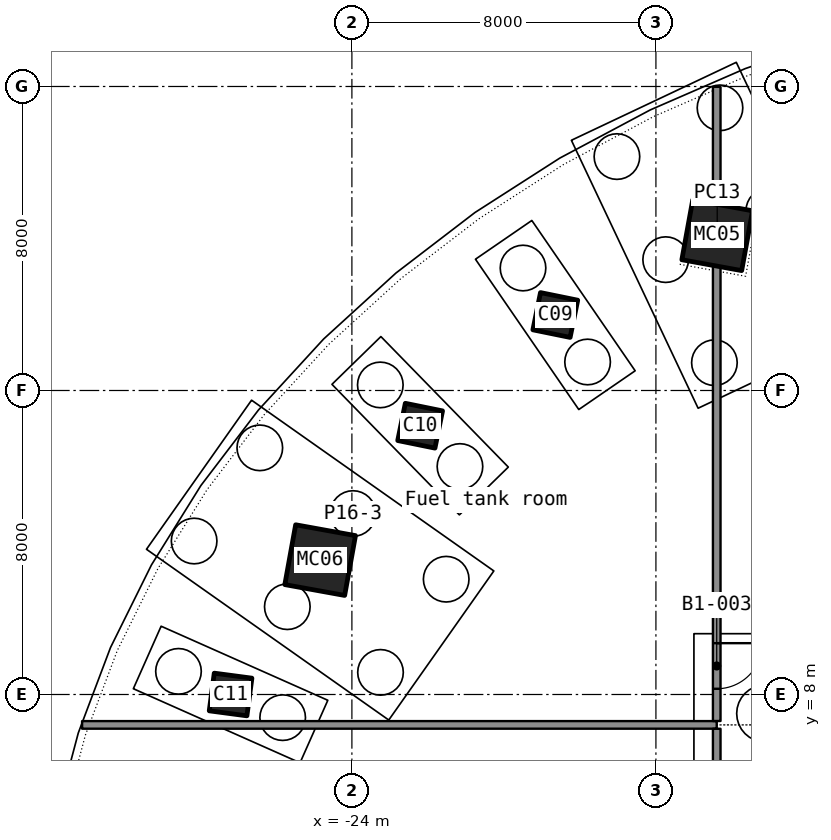
"""IFC4 building model, lengths in metres.
Left out: names, types, materials, properties, quantities, classifications, styles, units other than length and angle.
Written with IfcOpenShell. Run it as: python <this file> out.ifc"""

import sys

from ifc_helpers import new_model, si_unit, direction, frame, frame_2d, origin, origin_2d, place, context, subcontext, project, spatial, rectangle, hollow_rectangle, extrude, element, fill, save


model = new_model("IFC4")
c1 = context("Model", 3, precision=1e-05, world=origin(), true_north=direction((0.0, 1.0)))
c2 = subcontext(c1, "Body", "Model", "MODEL_VIEW")
j1 = project(units=[si_unit("LENGTHUNIT", "METRE"), si_unit("PLANEANGLEUNIT", "RADIAN")], contexts=[c1])
p1 = place(None, origin())
s1 = spatial("IfcSite", under=j1, at=p1, CompositionType="ELEMENT")
p2 = place(p1, origin())
s2 = spatial("IfcBuilding", under=s1, at=p2, CompositionType="ELEMENT")
p3 = place(p2, frame((0.0, 0.0, -5.0)))
s3 = spatial("IfcBuildingStorey", under=s2, at=p3, CompositionType="ELEMENT", Elevation=-5.0)
p4 = place(p3, frame((-14.387, 20.085, 0.0), z_axis=(0.017326178, -0.02450068, 0.999549659), x_axis=(0.906542435, 0.422080558, -0.005368072)))
e1 = element("IfcColumn", 1, at=p4, inside=s3, PredefinedType="COLUMN", context=c2, shape_type="SweptSolid", body=[
    extrude(hollow_rectangle(XDim=1.6, YDim=1.6, WallThickness=0.04, at=origin_2d()), origin(), (0.0, 0.0, 1.0), 5.002),
])
p5 = place(p3, frame((-18.647, 17.986, 0.0), z_axis=(0.022206077, -0.021718031, 0.999517492), x_axis=(0.827946422, 0.560772827, -0.006209556)))
e2 = element("IfcColumn", 2, at=p5, inside=s3, PredefinedType="COLUMN", context=c2, shape_type="SweptSolid", body=[
    extrude(hollow_rectangle(XDim=1.0, YDim=1.0, WallThickness=0.032, at=origin_2d()), origin(), (0.0, 0.0, 1.0), 5.002),
])
p6 = place(p3, frame((-22.204, 15.073, 0.0), z_axis=(0.026451197, -0.018203499, 0.99948435), x_axis=(0.719938809, 0.694007913, -0.006413178)))
e3 = element("IfcColumn", 3, at=p6, inside=s3, PredefinedType="COLUMN", context=c2, shape_type="SweptSolid", body=[
    extrude(hollow_rectangle(XDim=1.0, YDim=1.0, WallThickness=0.032, at=origin_2d()), origin(), (0.0, 0.0, 1.0), 5.003),
])
p7 = place(p3, frame((-24.835, 11.536, 0.0), z_axis=(0.029964003, -0.014152379, 0.999450784), x_axis=(0.581238956, 0.813711512, -0.005903534)))
e4 = element("IfcColumn", 4, at=p7, inside=s3, PredefinedType="COLUMN", context=c2, shape_type="SweptSolid", body=[
    extrude(hollow_rectangle(XDim=1.6, YDim=1.6, WallThickness=0.04, at=origin_2d()), origin(), (0.0, 0.0, 1.0), 5.003),
])
p8 = place(p3, frame((-27.192, 8.0, 0.0), z_axis=(0.032500817, -0.009711205, 0.999424529), x_axis=(0.409851764, 0.912141214, -0.004465096)))
e5 = element("IfcColumn", 5, at=p8, inside=s3, PredefinedType="COLUMN", context=c2, shape_type="SweptSolid", body=[
    extrude(hollow_rectangle(XDim=1.0, YDim=1.0, WallThickness=0.032, at=origin_2d()), origin(), (0.0, 0.0, 1.0), 5.003),
])
p9 = place(p3, frame((-14.4, 7.2, 0.0), z_axis=(0.0, 0.0, 1.0), x_axis=(-1.0, 0.0, 0.0)))
e6 = element("IfcWall", 6, at=p9, inside=s3, PredefinedType="PARTITIONING", context=c2, shape_type="SweptSolid", body=[
    extrude(rectangle(XDim=16.7, YDim=0.2, at=frame_2d((8.35, 0.0))), origin(), (0.0, 0.0, 1.0), 3.6),
])
p10 = place(p3, frame((-14.4, 7.098, 0.0), z_axis=(0.0, 0.0, 1.0), x_axis=(0.0, -1.0, 0.0)))
e7 = element("IfcWall", 7, at=p10, inside=s3, PredefinedType="PARTITIONING", context=c2, shape_type="SweptSolid", body=[
    extrude(rectangle(XDim=14.196, YDim=0.2, at=frame_2d((7.098, 0.0))), origin(), (0.0, 0.0, 1.0), 3.6),
])
p11 = place(p10, frame((6.498, 0.0, 0.0)))
e8 = element("IfcOpeningElement", 8, at=p11, cuts=e7, PredefinedType="OPENING", context=c2, shape_type="SweptSolid", body=[
    extrude(rectangle(XDim=1.2, YDim=2.2, at=frame_2d((0.6, 1.1))), frame((0.0, 0.11, 0.0), z_axis=(0.0, -1.0, 0.0), x_axis=(1.0, 0.0, 0.0)), (0.0, 0.0, 1.0), 0.22),
])
p12 = place(p3, frame((-14.4, 10.2, 0.0), z_axis=(0.0, 0.0, 1.0), x_axis=(0.0, 1.0, 0.0)))
e9 = element("IfcWall", 9, at=p12, inside=s3, PredefinedType="PARTITIONING", context=c2, shape_type="SweptSolid", body=[
    extrude(rectangle(XDim=13.791, YDim=0.2, at=frame_2d((6.896, 0.0))), origin(), (0.0, 0.0, 1.0), 3.6),
])
p13 = place(p3, frame((-7.302, 10.2, 0.0), z_axis=(0.0, 0.0, 1.0), x_axis=(-1.0, 0.0, 0.0)))
e10 = element("IfcWall", 10, at=p13, inside=s3, PredefinedType="PARTITIONING", context=c2, shape_type="SweptSolid", body=[
    extrude(rectangle(XDim=6.996, YDim=0.2, at=frame_2d((3.498, 0.0))), origin(), (0.0, 0.0, 1.0), 3.6),
])
p14 = place(p13, frame((2.898, 0.0, 0.0)))
e11 = element("IfcOpeningElement", 11, at=p14, cuts=e10, PredefinedType="OPENING", context=c2, shape_type="SweptSolid", body=[
    extrude(rectangle(XDim=1.2, YDim=2.2, at=frame_2d((0.6, 1.1))), frame((0.0, 0.11, 0.0), z_axis=(0.0, -1.0, 0.0), x_axis=(1.0, 0.0, 0.0)), (0.0, 0.0, 1.0), 0.22),
])
p15 = place(p3, frame((-14.4, 10.199, 0.0), z_axis=(0.0, 0.0, 1.0), x_axis=(0.0, -1.0, 0.0)))
e12 = element("IfcWall", 12, at=p15, inside=s3, PredefinedType="PARTITIONING", context=c2, shape_type="SweptSolid", body=[
    extrude(rectangle(XDim=2.897, YDim=0.2, at=frame_2d((1.448, 0.0))), origin(), (0.0, 0.0, 1.0), 3.6),
])
p16 = place(p15, frame((0.848, 0.0, 0.0)))
e13 = element("IfcOpeningElement", 13, at=p16, cuts=e12, PredefinedType="OPENING", context=c2, shape_type="SweptSolid", body=[
    extrude(rectangle(XDim=1.2, YDim=2.2, at=frame_2d((0.6, 1.1))), frame((0.0, 0.11, 0.0), z_axis=(0.0, -1.0, 0.0), x_axis=(1.0, 0.0, 0.0)), (0.0, 0.0, 1.0), 0.22),
])
p17 = place(p16, origin())
e14 = element("IfcDoor", 14, at=p17, inside=s3, OperationType="DOUBLE_DOOR_SINGLE_SWING", PredefinedType="DOOR", context=c2, shape_type="SweptSolid", body=[
    extrude(rectangle(XDim=1.2, YDim=2.2, at=frame_2d((0.6, 1.1))), frame((0.0, 0.025, 0.0), z_axis=(0.0, -1.0, 0.0), x_axis=(1.0, 0.0, 0.0)), (0.0, 0.0, 1.0), 0.05),
])
fill(e13, e14)
save(model, sys.argv[1])
